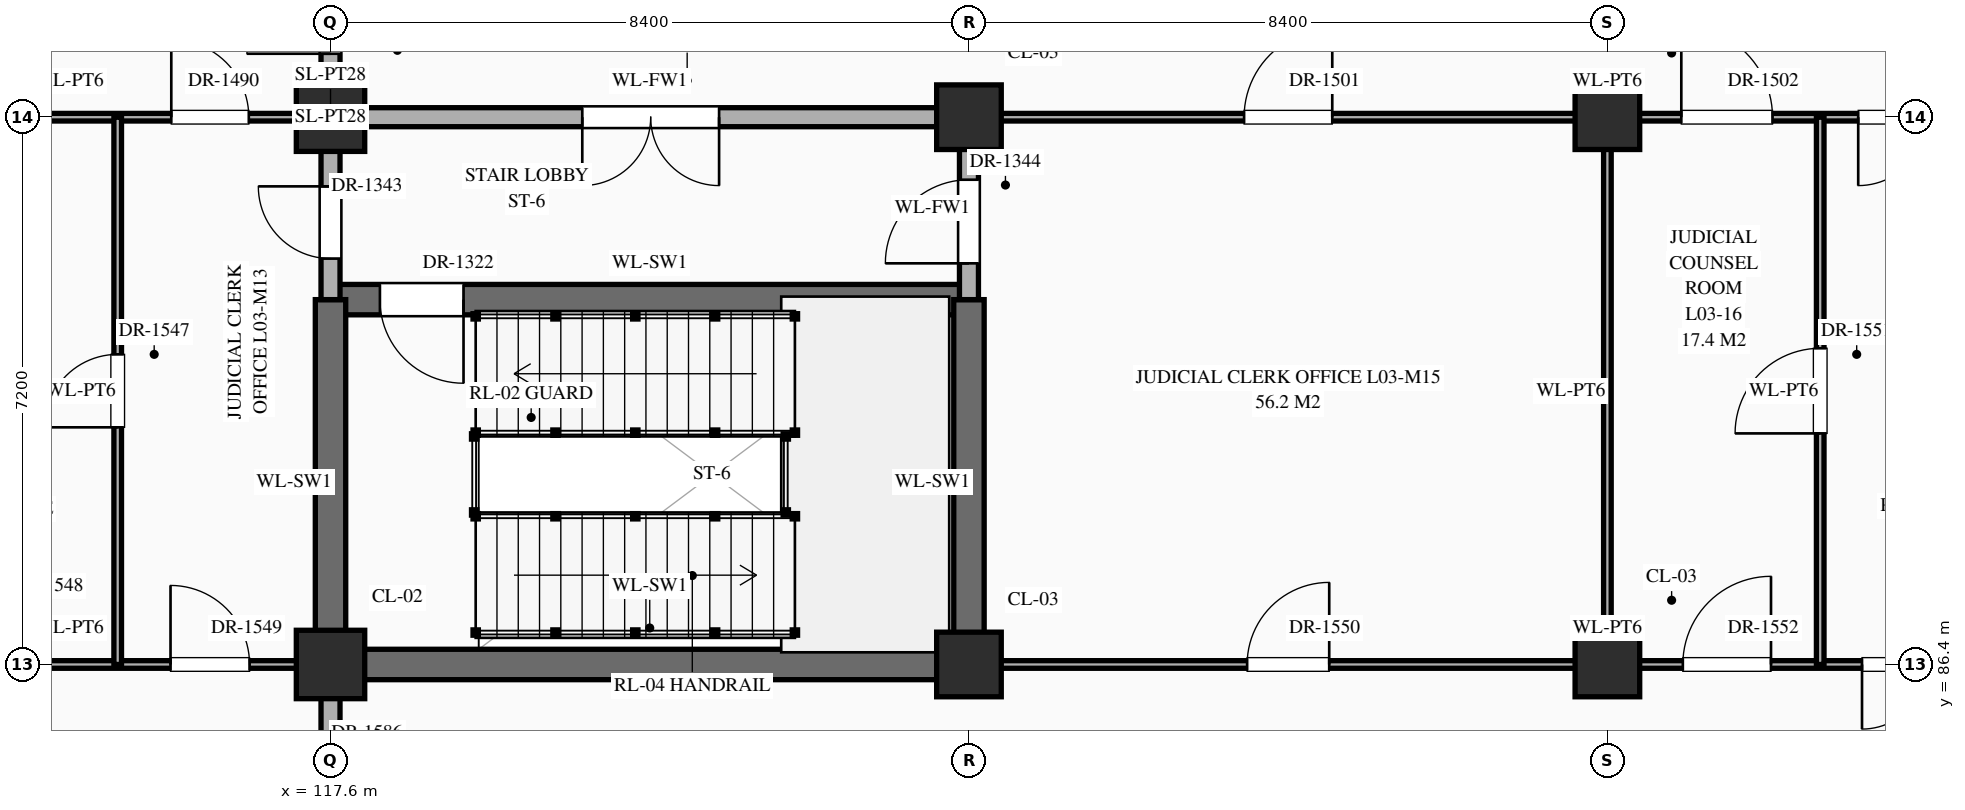
"""IFC4 building model, lengths in metres.
Left out: names, types, materials, properties, quantities, classifications, styles, units other than length and angle.
Written with IfcOpenShell. Run it as: python <this file> out.ifc"""

import sys

from ifc_helpers import new_model, si_unit, direction, frame, frame_2d, origin, origin_2d, place, context, subcontext, project, spatial, rectangle, extrude, element, fill, save


model = new_model("IFC4")
c1 = context("Model", 3, precision=1e-05, world=origin(), true_north=direction((0.0, 1.0)))
c2 = subcontext(c1, "Body", "Model", "MODEL_VIEW")
j1 = project(units=[si_unit("LENGTHUNIT", "METRE"), si_unit("PLANEANGLEUNIT", "RADIAN")], contexts=[c1])
p1 = place(None, origin())
s1 = spatial("IfcSite", under=j1, at=p1, CompositionType="ELEMENT")
p2 = place(p1, origin())
s2 = spatial("IfcBuilding", under=s1, at=p2, CompositionType="ELEMENT")
p3 = place(p2, frame((0.0, 0.0, 10.8)))
s3 = spatial("IfcBuildingStorey", under=s2, at=p3, CompositionType="ELEMENT", Elevation=10.8)
for number, where, z_axis, x_axis in (
    (1, (117.6, 86.4, 0.0), (0.0, 0.0, 1.0), (1.0, 0.0, 0.0)),
    (2, (117.6, 93.6, 0.0), (0.0, 0.0, 1.0), (1.0, 0.0, 0.0)),
):
    element("IfcColumn", number, at=place(p3, frame(where, z_axis=z_axis, x_axis=x_axis)), inside=s3, PredefinedType="COLUMN", context=c2, shape_type="SweptSolid", body=[
        extrude(rectangle(XDim=0.9, YDim=0.9, at=origin_2d()), origin(), (0.0, 0.0, 1.0), 5.4),
    ])
for number, where, z_axis, x_axis in (
    (3, (126.0, 86.4, 0.0), (0.0, 0.0, 1.0), (1.0, 0.0, 0.0)),
    (4, (126.0, 93.6, 0.0), (0.0, 0.0, 1.0), (1.0, 0.0, 0.0)),
    (5, (134.4, 86.4, 0.0), (0.0, 0.0, 1.0), (1.0, 0.0, 0.0)),
    (6, (134.4, 93.6, 0.0), (0.0, 0.0, 1.0), (1.0, 0.0, 0.0)),
):
    element("IfcColumn", number, at=place(p3, frame(where, z_axis=z_axis, x_axis=x_axis)), inside=s3, PredefinedType="COLUMN", context=c2, shape_type="SweptSolid", body=[
        extrude(rectangle(XDim=0.85, YDim=0.85, at=origin_2d()), origin(), (0.0, 0.0, 1.0), 5.4),
    ])
p4 = place(p3, frame((109.2, 86.4, 0.0), z_axis=(0.0, 0.0, 1.0), x_axis=(1.0, 0.0, 0.0)))
e7 = element("IfcWall", 7, at=p4, inside=s3, PredefinedType="STANDARD", context=c2, shape_type="SweptSolid", body=[
    extrude(rectangle(XDim=8.4, YDim=0.1, at=frame_2d((4.2, 0.0))), origin(), (0.0, 0.0, 1.0), 4.27),
])
p5 = place(p4, frame((1.125, 0.0, 0.0)))
e8 = element("IfcOpeningElement", 8, at=p5, cuts=e7, PredefinedType="OPENING", context=c2, shape_type="SweptSolid", body=[
    extrude(rectangle(XDim=0.92, YDim=2.15, at=frame_2d((0.46, 1.075))), frame((0.0, 0.062, 0.0), z_axis=(0.0, -1.0, 0.0), x_axis=(1.0, 0.0, 0.0)), (0.0, 0.0, 1.0), 0.124),
])
p6 = place(p4, frame((3.7, 0.0, 0.0)))
e9 = element("IfcOpeningElement", 9, at=p6, cuts=e7, PredefinedType="OPENING", context=c2, shape_type="SweptSolid", body=[
    extrude(rectangle(XDim=1.0, YDim=2.25, at=frame_2d((0.5, 1.125))), frame((0.0, 0.062, 0.0), z_axis=(0.0, -1.0, 0.0), x_axis=(1.0, 0.0, 0.0)), (0.0, 0.0, 1.0), 0.124),
])
p7 = place(p4, frame((6.295, 0.0, 0.0)))
e10 = element("IfcOpeningElement", 10, at=p7, cuts=e7, PredefinedType="OPENING", context=c2, shape_type="SweptSolid", body=[
    extrude(rectangle(XDim=1.04, YDim=2.2, at=frame_2d((0.52, 1.1))), frame((0.0, 0.062, 0.0), z_axis=(0.0, -1.0, 0.0), x_axis=(1.0, 0.0, 0.0)), (0.0, 0.0, 1.0), 0.124),
])
p8 = place(p3, frame((117.6, 86.4, 0.0), z_axis=(0.0, 0.0, 1.0), x_axis=(1.0, 0.0, 0.0)))
e11 = element("IfcWall", 11, at=p8, inside=s3, PredefinedType="SHEAR", context=c2, shape_type="SweptSolid", body=[
    extrude(rectangle(XDim=8.4, YDim=0.4, at=frame_2d((4.2, 0.0))), origin(), (0.0, 0.0, 1.0), 5.12),
])
p9 = place(p3, frame((126.0, 86.4, 0.0), z_axis=(0.0, 0.0, 1.0), x_axis=(1.0, 0.0, 0.0)))
e12 = element("IfcWall", 12, at=p9, inside=s3, PredefinedType="STANDARD", context=c2, shape_type="SweptSolid", body=[
    extrude(rectangle(XDim=16.8, YDim=0.1, at=frame_2d((8.4, 0.0))), origin(), (0.0, 0.0, 1.0), 4.27),
])
p10 = place(p9, frame((3.66, 0.0, 0.0)))
e13 = element("IfcOpeningElement", 13, at=p10, cuts=e12, PredefinedType="OPENING", context=c2, shape_type="SweptSolid", body=[
    extrude(rectangle(XDim=1.08, YDim=2.25, at=frame_2d((0.54, 1.125))), frame((0.0, 0.062, 0.0), z_axis=(0.0, -1.0, 0.0), x_axis=(1.0, 0.0, 0.0)), (0.0, 0.0, 1.0), 0.124),
])
p11 = place(p9, frame((9.393, 0.0, 0.0)))
e14 = element("IfcOpeningElement", 14, at=p11, cuts=e12, PredefinedType="OPENING", context=c2, shape_type="SweptSolid", body=[
    extrude(rectangle(XDim=1.16, YDim=2.3, at=frame_2d((0.58, 1.15))), frame((0.0, 0.062, 0.0), z_axis=(0.0, -1.0, 0.0), x_axis=(1.0, 0.0, 0.0)), (0.0, 0.0, 1.0), 0.124),
])
p12 = place(p9, frame((11.75, 0.0, 0.0)))
e15 = element("IfcOpeningElement", 15, at=p12, cuts=e12, PredefinedType="OPENING", context=c2, shape_type="SweptSolid", body=[
    extrude(rectangle(XDim=1.7, YDim=2.45, at=frame_2d((0.85, 1.225))), frame((0.0, 0.062, 0.0), z_axis=(0.0, -1.0, 0.0), x_axis=(1.0, 0.0, 0.0)), (0.0, 0.0, 1.0), 0.124),
])
p13 = place(p9, frame((14.587, 0.0, 0.0)))
e16 = element("IfcOpeningElement", 16, at=p13, cuts=e12, PredefinedType="OPENING", context=c2, shape_type="SweptSolid", body=[
    extrude(rectangle(XDim=1.28, YDim=2.35, at=frame_2d((0.64, 1.175))), frame((0.0, 0.062, 0.0), z_axis=(0.0, -1.0, 0.0), x_axis=(1.0, 0.0, 0.0)), (0.0, 0.0, 1.0), 0.124),
])
p14 = place(p3, frame((117.6, 91.2, 0.0), z_axis=(0.0, 0.0, 1.0), x_axis=(1.0, 0.0, 0.0)))
e17 = element("IfcWall", 17, at=p14, inside=s3, PredefinedType="SHEAR", context=c2, shape_type="SweptSolid", body=[
    extrude(rectangle(XDim=8.4, YDim=0.4, at=frame_2d((4.2, 0.0))), origin(), (0.0, 0.0, 1.0), 5.12),
])
p15 = place(p14, frame((0.65, 0.0, 0.0)))
e18 = element("IfcOpeningElement", 18, at=p15, cuts=e17, PredefinedType="OPENING", context=c2, shape_type="SweptSolid", body=[
    extrude(rectangle(XDim=1.1, YDim=2.2, at=frame_2d((0.55, 1.1))), frame((0.0, 0.212, 0.0), z_axis=(0.0, -1.0, 0.0), x_axis=(1.0, 0.0, 0.0)), (0.0, 0.0, 1.0), 0.424),
])
p16 = place(p3, frame((109.2, 93.6, 0.0), z_axis=(0.0, 0.0, 1.0), x_axis=(1.0, 0.0, 0.0)))
e19 = element("IfcWall", 19, at=p16, inside=s3, PredefinedType="STANDARD", context=c2, shape_type="SweptSolid", body=[
    extrude(rectangle(XDim=8.4, YDim=0.1, at=frame_2d((4.2, 0.0))), origin(), (0.0, 0.0, 1.0), 4.27),
])
p17 = place(p16, frame((1.115, 0.0, 0.0)))
e20 = element("IfcOpeningElement", 20, at=p17, cuts=e19, PredefinedType="OPENING", context=c2, shape_type="SweptSolid", body=[
    extrude(rectangle(XDim=0.94, YDim=2.3, at=frame_2d((0.47, 1.15))), frame((0.0, 0.062, 0.0), z_axis=(0.0, -1.0, 0.0), x_axis=(1.0, 0.0, 0.0)), (0.0, 0.0, 1.0), 0.124),
])
p18 = place(p16, frame((3.71, 0.0, 0.0)))
e21 = element("IfcOpeningElement", 21, at=p18, cuts=e19, PredefinedType="OPENING", context=c2, shape_type="SweptSolid", body=[
    extrude(rectangle(XDim=0.98, YDim=2.35, at=frame_2d((0.49, 1.175))), frame((0.0, 0.062, 0.0), z_axis=(0.0, -1.0, 0.0), x_axis=(1.0, 0.0, 0.0)), (0.0, 0.0, 1.0), 0.124),
])
p19 = place(p16, frame((6.305, 0.0, 0.0)))
e22 = element("IfcOpeningElement", 22, at=p19, cuts=e19, PredefinedType="OPENING", context=c2, shape_type="SweptSolid", body=[
    extrude(rectangle(XDim=1.02, YDim=2.4, at=frame_2d((0.51, 1.2))), frame((0.0, 0.062, 0.0), z_axis=(0.0, -1.0, 0.0), x_axis=(1.0, 0.0, 0.0)), (0.0, 0.0, 1.0), 0.124),
])
p20 = place(p3, frame((117.6, 93.6, 0.0), z_axis=(0.0, 0.0, 1.0), x_axis=(1.0, 0.0, 0.0)))
e23 = element("IfcWall", 23, at=p20, inside=s3, PredefinedType="STANDARD", context=c2, shape_type="SweptSolid", body=[
    extrude(rectangle(XDim=8.4, YDim=0.25, at=frame_2d((4.2, 0.0))), origin(), (0.0, 0.0, 1.0), 4.27),
])
p21 = place(p20, frame((3.312, 0.0, 0.0)))
e24 = element("IfcOpeningElement", 24, at=p21, cuts=e23, PredefinedType="OPENING", context=c2, shape_type="SweptSolid", body=[
    extrude(rectangle(XDim=1.8, YDim=2.35, at=frame_2d((0.9, 1.175))), frame((0.0, 0.137, 0.0), z_axis=(0.0, -1.0, 0.0), x_axis=(1.0, 0.0, 0.0)), (0.0, 0.0, 1.0), 0.274),
])
p22 = place(p3, frame((126.0, 93.6, 0.0), z_axis=(0.0, 0.0, 1.0), x_axis=(1.0, 0.0, 0.0)))
e25 = element("IfcWall", 25, at=p22, inside=s3, PredefinedType="STANDARD", context=c2, shape_type="SweptSolid", body=[
    extrude(rectangle(XDim=16.8, YDim=0.1, at=frame_2d((8.4, 0.0))), origin(), (0.0, 0.0, 1.0), 4.27),
])
p23 = place(p22, frame((3.62, 0.0, 0.0)))
e26 = element("IfcOpeningElement", 26, at=p23, cuts=e25, PredefinedType="OPENING", context=c2, shape_type="SweptSolid", body=[
    extrude(rectangle(XDim=1.16, YDim=2.3, at=frame_2d((0.58, 1.15))), frame((0.0, 0.062, 0.0), z_axis=(0.0, -1.0, 0.0), x_axis=(1.0, 0.0, 0.0)), (0.0, 0.0, 1.0), 0.124),
])
p24 = place(p22, frame((9.373, 0.0, 0.0)))
e27 = element("IfcOpeningElement", 27, at=p24, cuts=e25, PredefinedType="OPENING", context=c2, shape_type="SweptSolid", body=[
    extrude(rectangle(XDim=1.2, YDim=2.35, at=frame_2d((0.6, 1.175))), frame((0.0, 0.062, 0.0), z_axis=(0.0, -1.0, 0.0), x_axis=(1.0, 0.0, 0.0)), (0.0, 0.0, 1.0), 0.124),
])
p25 = place(p22, frame((11.7, 0.0, 0.0)))
e28 = element("IfcOpeningElement", 28, at=p25, cuts=e25, PredefinedType="OPENING", context=c2, shape_type="SweptSolid", body=[
    extrude(rectangle(XDim=1.8, YDim=2.5, at=frame_2d((0.9, 1.25))), frame((0.0, 0.062, 0.0), z_axis=(0.0, -1.0, 0.0), x_axis=(1.0, 0.0, 0.0)), (0.0, 0.0, 1.0), 0.124),
])
p26 = place(p22, frame((14.587, 0.0, 0.0)))
e29 = element("IfcOpeningElement", 29, at=p26, cuts=e25, PredefinedType="OPENING", context=c2, shape_type="SweptSolid", body=[
    extrude(rectangle(XDim=1.28, YDim=2.35, at=frame_2d((0.64, 1.175))), frame((0.0, 0.062, 0.0), z_axis=(0.0, -1.0, 0.0), x_axis=(1.0, 0.0, 0.0)), (0.0, 0.0, 1.0), 0.124),
])
p27 = place(p3, frame((114.8, 86.4, 0.0), z_axis=(0.0, 0.0, 1.0), x_axis=(0.0, 1.0, 0.0)))
e30 = element("IfcWall", 30, at=p27, inside=s3, PredefinedType="STANDARD", context=c2, shape_type="SweptSolid", body=[
    extrude(rectangle(XDim=7.2, YDim=0.1, at=frame_2d((3.6, 0.0))), origin(), (0.0, 0.0, 1.0), 5.12),
])
p28 = place(p27, frame((3.12, 0.0, 0.0)))
e31 = element("IfcOpeningElement", 31, at=p28, cuts=e30, PredefinedType="OPENING", context=c2, shape_type="SweptSolid", body=[
    extrude(rectangle(XDim=0.96, YDim=2.2, at=frame_2d((0.48, 1.1))), frame((0.0, 0.062, 0.0), z_axis=(0.0, -1.0, 0.0), x_axis=(1.0, 0.0, 0.0)), (0.0, 0.0, 1.0), 0.124),
])
p29 = place(p3, frame((117.6, 79.24, 0.0), z_axis=(0.0, 0.0, 1.0), x_axis=(0.0, 1.0, 0.0)))
e32 = element("IfcWall", 32, at=p29, inside=s3, PredefinedType="STANDARD", context=c2, shape_type="SweptSolid", body=[
    extrude(rectangle(XDim=7.16, YDim=0.25, at=frame_2d((3.58, 0.0))), origin(), (0.0, 0.0, 1.0), 4.37),
])
p30 = place(p29, frame((5.3, 0.0, 0.0)))
e33 = element("IfcOpeningElement", 33, at=p30, cuts=e32, PredefinedType="OPENING", context=c2, shape_type="SweptSolid", body=[
    extrude(rectangle(XDim=0.95, YDim=2.15, at=frame_2d((0.475, 1.075))), frame((0.0, 0.137, 0.0), z_axis=(0.0, -1.0, 0.0), x_axis=(1.0, 0.0, 0.0)), (0.0, 0.0, 1.0), 0.274),
])
p31 = place(p3, frame((117.6, 86.4, 0.0), z_axis=(0.0, 0.0, 1.0), x_axis=(0.0, 1.0, 0.0)))
e34 = element("IfcWall", 34, at=p31, inside=s3, PredefinedType="SHEAR", context=c2, shape_type="SweptSolid", body=[
    extrude(rectangle(XDim=4.8, YDim=0.4, at=frame_2d((2.4, 0.0))), origin(), (0.0, 0.0, 1.0), 5.12),
])
p32 = place(p3, frame((117.6, 91.2, 0.0), z_axis=(0.0, 0.0, 1.0), x_axis=(0.0, 1.0, 0.0)))
e35 = element("IfcWall", 35, at=p32, inside=s3, PredefinedType="STANDARD", context=c2, shape_type="SweptSolid", body=[
    extrude(rectangle(XDim=13.2, YDim=0.25, at=frame_2d((6.6, 0.0))), origin(), (0.0, 0.0, 1.0), 4.37),
])
p33 = place(p32, frame((0.54, 0.0, 0.0)))
e36 = element("IfcOpeningElement", 36, at=p33, cuts=e35, PredefinedType="OPENING", context=c2, shape_type="SweptSolid", body=[
    extrude(rectangle(XDim=0.95, YDim=2.15, at=frame_2d((0.475, 1.075))), frame((0.0, 0.137, 0.0), z_axis=(0.0, -1.0, 0.0), x_axis=(1.0, 0.0, 0.0)), (0.0, 0.0, 1.0), 0.274),
])
p34 = place(p32, frame((10.51, 0.0, 0.0)))
e37 = element("IfcOpeningElement", 37, at=p34, cuts=e35, PredefinedType="OPENING", context=c2, shape_type="SweptSolid", body=[
    extrude(rectangle(XDim=0.95, YDim=2.15, at=frame_2d((0.475, 1.075))), frame((0.0, 0.137, 0.0), z_axis=(0.0, -1.0, 0.0), x_axis=(1.0, 0.0, 0.0)), (0.0, 0.0, 1.0), 0.274),
])
p35 = place(p32, frame((3.235, 0.0, 0.0)))
e38 = element("IfcOpeningElement", 38, at=p35, cuts=e35, PredefinedType="OPENING", context=c2, shape_type="SweptSolid", body=[
    extrude(rectangle(XDim=1.1, YDim=2.2, at=frame_2d((0.55, 1.1))), frame((0.0, 0.137, 0.0), z_axis=(0.0, -1.0, 0.0), x_axis=(1.0, 0.0, 0.0)), (0.0, 0.0, 1.0), 0.274),
])
p36 = place(p3, frame((126.0, 86.4, 0.0), z_axis=(0.0, 0.0, 1.0), x_axis=(0.0, 1.0, 0.0)))
e39 = element("IfcWall", 39, at=p36, inside=s3, PredefinedType="SHEAR", context=c2, shape_type="SweptSolid", body=[
    extrude(rectangle(XDim=4.8, YDim=0.4, at=frame_2d((2.4, 0.0))), origin(), (0.0, 0.0, 1.0), 5.12),
])
p37 = place(p3, frame((126.0, 91.2, 0.0), z_axis=(0.0, 0.0, 1.0), x_axis=(0.0, 1.0, 0.0)))
e40 = element("IfcWall", 40, at=p37, inside=s3, PredefinedType="STANDARD", context=c2, shape_type="SweptSolid", body=[
    extrude(rectangle(XDim=2.4, YDim=0.25, at=frame_2d((1.2, 0.0))), origin(), (0.0, 0.0, 1.0), 4.37),
])
p38 = place(p37, frame((0.478, 0.0, 0.0)))
e41 = element("IfcOpeningElement", 41, at=p38, cuts=e40, PredefinedType="OPENING", context=c2, shape_type="SweptSolid", body=[
    extrude(rectangle(XDim=1.1, YDim=2.2, at=frame_2d((0.55, 1.1))), frame((0.0, 0.137, 0.0), z_axis=(0.0, -1.0, 0.0), x_axis=(1.0, 0.0, 0.0)), (0.0, 0.0, 1.0), 0.274),
])
p39 = place(p3, frame((134.4, 86.4, 0.0), z_axis=(0.0, 0.0, 1.0), x_axis=(0.0, 1.0, 0.0)))
e42 = element("IfcWall", 42, at=p39, inside=s3, PredefinedType="STANDARD", context=c2, shape_type="SweptSolid", body=[
    extrude(rectangle(XDim=7.2, YDim=0.1, at=frame_2d((3.6, 0.0))), origin(), (0.0, 0.0, 1.0), 4.37),
])
p40 = place(p3, frame((137.2, 86.4, 0.0), z_axis=(0.0, 0.0, 1.0), x_axis=(0.0, 1.0, 0.0)))
e43 = element("IfcWall", 43, at=p40, inside=s3, PredefinedType="STANDARD", context=c2, shape_type="SweptSolid", body=[
    extrude(rectangle(XDim=7.2, YDim=0.1, at=frame_2d((3.6, 0.0))), origin(), (0.0, 0.0, 1.0), 5.12),
])
p41 = place(p40, frame((3.04, 0.0, 0.0)))
e44 = element("IfcOpeningElement", 44, at=p41, cuts=e43, PredefinedType="OPENING", context=c2, shape_type="SweptSolid", body=[
    extrude(rectangle(XDim=1.12, YDim=2.25, at=frame_2d((0.56, 1.125))), frame((0.0, 0.062, 0.0), z_axis=(0.0, -1.0, 0.0), x_axis=(1.0, 0.0, 0.0)), (0.0, 0.0, 1.0), 0.124),
])
p42 = place(p15, frame((1.1, 0.0, 0.0), z_axis=(0.0, 0.0, 1.0), x_axis=(-1.0, 0.0, 0.0)))
e45 = element("IfcDoor", 45, at=p42, inside=s3, OperationType="SINGLE_SWING_LEFT", PredefinedType="DOOR", context=c2, shape_type="SweptSolid", body=[
    extrude(rectangle(XDim=1.1, YDim=2.2, at=frame_2d((0.55, 1.1))), frame((0.0, 0.025, 0.0), z_axis=(0.0, -1.0, 0.0), x_axis=(1.0, 0.0, 0.0)), (0.0, 0.0, 1.0), 0.05),
])
fill(e18, e45)
p43 = place(p21, frame((1.8, 0.0, 0.0), z_axis=(0.0, 0.0, 1.0), x_axis=(-1.0, 0.0, 0.0)))
e46 = element("IfcDoor", 46, at=p43, inside=s3, OperationType="DOUBLE_DOOR_SINGLE_SWING", PredefinedType="DOOR", context=c2, shape_type="SweptSolid", body=[
    extrude(rectangle(XDim=1.8, YDim=2.35, at=frame_2d((0.9, 1.175))), frame((0.0, 0.025, 0.0), z_axis=(0.0, -1.0, 0.0), x_axis=(1.0, 0.0, 0.0)), (0.0, 0.0, 1.0), 0.05),
])
fill(e24, e46)
p44 = place(p33, origin())
e47 = element("IfcDoor", 47, at=p44, inside=s3, OperationType="SINGLE_SWING_RIGHT", PredefinedType="DOOR", context=c2, shape_type="SweptSolid", body=[
    extrude(rectangle(XDim=0.95, YDim=2.15, at=frame_2d((0.475, 1.075))), frame((0.0, 0.025, 0.0), z_axis=(0.0, -1.0, 0.0), x_axis=(1.0, 0.0, 0.0)), (0.0, 0.0, 1.0), 0.05),
])
fill(e36, e47)
p45 = place(p38, origin())
e48 = element("IfcDoor", 48, at=p45, inside=s3, OperationType="SINGLE_SWING_LEFT", PredefinedType="DOOR", context=c2, shape_type="SweptSolid", body=[
    extrude(rectangle(XDim=1.1, YDim=2.2, at=frame_2d((0.55, 1.1))), frame((0.0, 0.025, 0.0), z_axis=(0.0, -1.0, 0.0), x_axis=(1.0, 0.0, 0.0)), (0.0, 0.0, 1.0), 0.05),
])
fill(e41, e48)
p46 = place(p35, origin())
e49 = element("IfcDoor", 49, at=p46, inside=s3, OperationType="SINGLE_SWING_LEFT", PredefinedType="DOOR", context=c2, shape_type="SweptSolid", body=[
    extrude(rectangle(XDim=1.1, YDim=2.2, at=frame_2d((0.55, 1.1))), frame((0.0, 0.025, 0.0), z_axis=(0.0, -1.0, 0.0), x_axis=(1.0, 0.0, 0.0)), (0.0, 0.0, 1.0), 0.05),
])
fill(e38, e49)
p47 = place(p19, origin())
e50 = element("IfcDoor", 50, at=p47, inside=s3, OperationType="SINGLE_SWING_LEFT", PredefinedType="DOOR", context=c2, shape_type="SweptSolid", body=[
    extrude(rectangle(XDim=1.02, YDim=2.4, at=frame_2d((0.51, 1.2))), frame((0.0, 0.025, 0.0), z_axis=(0.0, -1.0, 0.0), x_axis=(1.0, 0.0, 0.0)), (0.0, 0.0, 1.0), 0.05),
])
fill(e22, e50)
p48 = place(p23, origin())
e51 = element("IfcDoor", 51, at=p48, inside=s3, OperationType="SINGLE_SWING_RIGHT", PredefinedType="DOOR", context=c2, shape_type="SweptSolid", body=[
    extrude(rectangle(XDim=1.16, YDim=2.3, at=frame_2d((0.58, 1.15))), frame((0.0, 0.025, 0.0), z_axis=(0.0, -1.0, 0.0), x_axis=(1.0, 0.0, 0.0)), (0.0, 0.0, 1.0), 0.05),
])
fill(e26, e51)
p49 = place(p24, origin())
e52 = element("IfcDoor", 52, at=p49, inside=s3, OperationType="SINGLE_SWING_LEFT", PredefinedType="DOOR", context=c2, shape_type="SweptSolid", body=[
    extrude(rectangle(XDim=1.2, YDim=2.35, at=frame_2d((0.6, 1.175))), frame((0.0, 0.025, 0.0), z_axis=(0.0, -1.0, 0.0), x_axis=(1.0, 0.0, 0.0)), (0.0, 0.0, 1.0), 0.05),
])
fill(e27, e52)
p50 = place(p25, frame((1.8, 0.0, 0.0), z_axis=(0.0, 0.0, 1.0), x_axis=(-1.0, 0.0, 0.0)))
e53 = element("IfcDoor", 53, at=p50, inside=s3, OperationType="DOUBLE_DOOR_SINGLE_SWING", PredefinedType="DOOR", context=c2, shape_type="SweptSolid", body=[
    extrude(rectangle(XDim=1.8, YDim=2.5, at=frame_2d((0.9, 1.25))), frame((0.0, 0.025, 0.0), z_axis=(0.0, -1.0, 0.0), x_axis=(1.0, 0.0, 0.0)), (0.0, 0.0, 1.0), 0.05),
])
fill(e28, e53)
p51 = place(p28, origin())
e54 = element("IfcDoor", 54, at=p51, inside=s3, OperationType="SINGLE_SWING_LEFT", PredefinedType="DOOR", context=c2, shape_type="SweptSolid", body=[
    extrude(rectangle(XDim=0.96, YDim=2.2, at=frame_2d((0.48, 1.1))), frame((0.0, 0.025, 0.0), z_axis=(0.0, -1.0, 0.0), x_axis=(1.0, 0.0, 0.0)), (0.0, 0.0, 1.0), 0.05),
])
fill(e31, e54)
p52 = place(p7, origin())
e55 = element("IfcDoor", 55, at=p52, inside=s3, OperationType="SINGLE_SWING_LEFT", PredefinedType="DOOR", context=c2, shape_type="SweptSolid", body=[
    extrude(rectangle(XDim=1.04, YDim=2.2, at=frame_2d((0.52, 1.1))), frame((0.0, 0.025, 0.0), z_axis=(0.0, -1.0, 0.0), x_axis=(1.0, 0.0, 0.0)), (0.0, 0.0, 1.0), 0.05),
])
fill(e10, e55)
p53 = place(p10, origin())
e56 = element("IfcDoor", 56, at=p53, inside=s3, OperationType="SINGLE_SWING_RIGHT", PredefinedType="DOOR", context=c2, shape_type="SweptSolid", body=[
    extrude(rectangle(XDim=1.08, YDim=2.25, at=frame_2d((0.54, 1.125))), frame((0.0, 0.025, 0.0), z_axis=(0.0, -1.0, 0.0), x_axis=(1.0, 0.0, 0.0)), (0.0, 0.0, 1.0), 0.05),
])
fill(e13, e56)
p54 = place(p41, origin())
e57 = element("IfcDoor", 57, at=p54, inside=s3, OperationType="SINGLE_SWING_LEFT", PredefinedType="DOOR", context=c2, shape_type="SweptSolid", body=[
    extrude(rectangle(XDim=1.12, YDim=2.25, at=frame_2d((0.56, 1.125))), frame((0.0, 0.025, 0.0), z_axis=(0.0, -1.0, 0.0), x_axis=(1.0, 0.0, 0.0)), (0.0, 0.0, 1.0), 0.05),
])
fill(e44, e57)
p55 = place(p11, origin())
e58 = element("IfcDoor", 58, at=p55, inside=s3, OperationType="SINGLE_SWING_RIGHT", PredefinedType="DOOR", context=c2, shape_type="SweptSolid", body=[
    extrude(rectangle(XDim=1.16, YDim=2.3, at=frame_2d((0.58, 1.15))), frame((0.0, 0.025, 0.0), z_axis=(0.0, -1.0, 0.0), x_axis=(1.0, 0.0, 0.0)), (0.0, 0.0, 1.0), 0.05),
])
fill(e14, e58)
p56 = place(p12, frame((1.7, 0.0, 0.0), z_axis=(0.0, 0.0, 1.0), x_axis=(-1.0, 0.0, 0.0)))
e59 = element("IfcDoor", 59, at=p56, inside=s3, OperationType="DOUBLE_DOOR_SINGLE_SWING", PredefinedType="DOOR", context=c2, shape_type="SweptSolid", body=[
    extrude(rectangle(XDim=1.7, YDim=2.45, at=frame_2d((0.85, 1.225))), frame((0.0, 0.025, 0.0), z_axis=(0.0, -1.0, 0.0), x_axis=(1.0, 0.0, 0.0)), (0.0, 0.0, 1.0), 0.05),
])
fill(e15, e59)
save(model, sys.argv[1])
